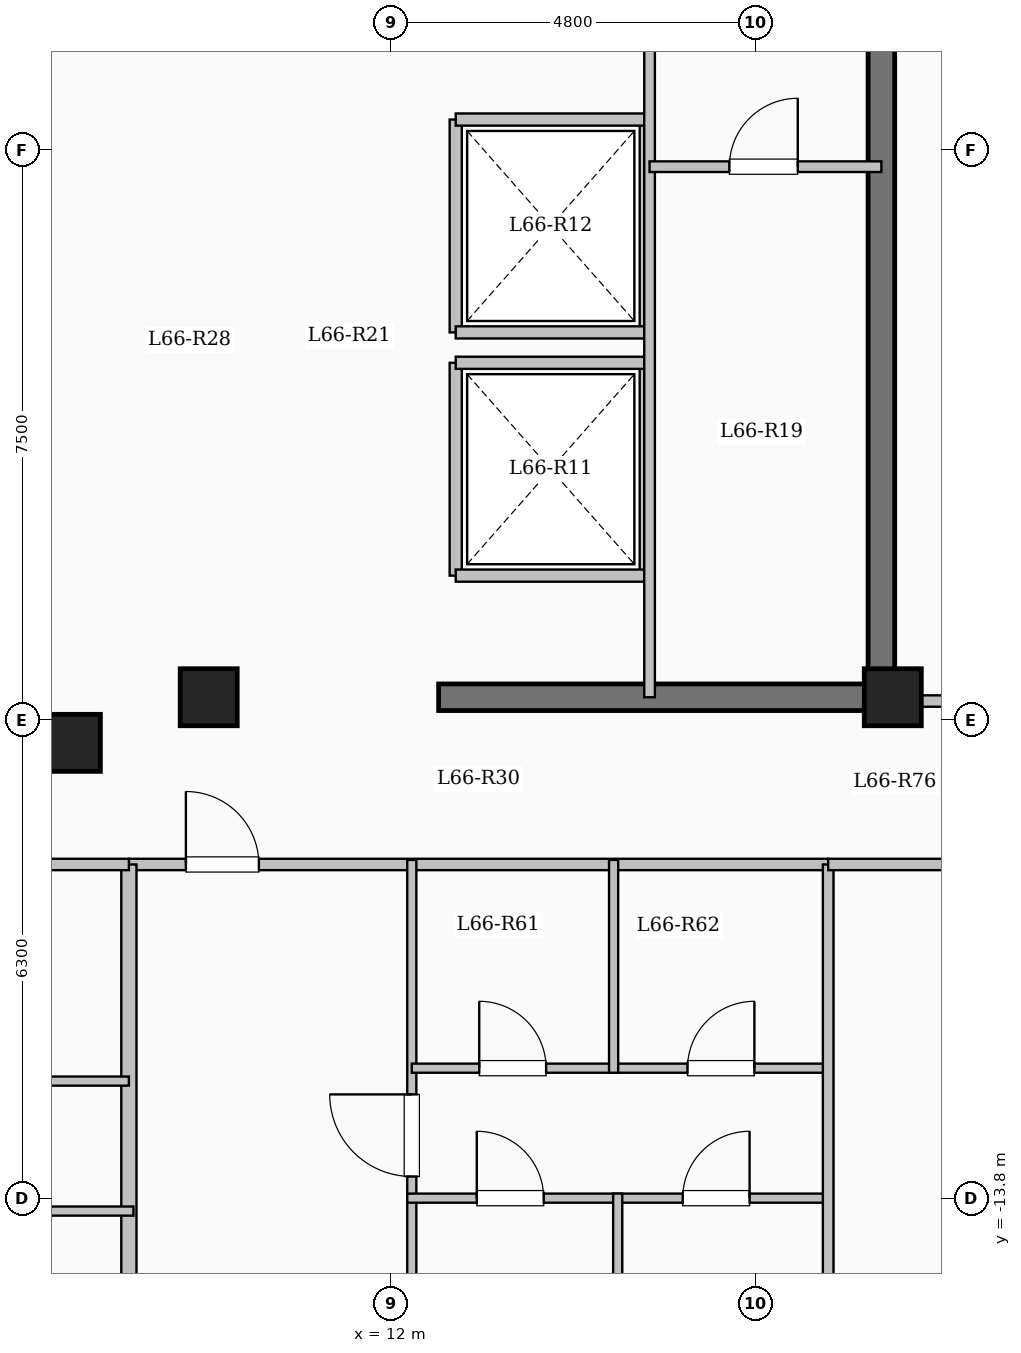
"""IFC4 building model, lengths in metres.
Left out: names, types, materials, properties, quantities, classifications, styles, units other than length and angle.
Written with IfcOpenShell. Run it as: python <this file> out.ifc"""

import sys

from ifc_helpers import new_model, si_unit, direction, frame, frame_2d, origin, origin_2d, place, context, subcontext, project, spatial, rectangle, extrude, element, fill, save


model = new_model("IFC4")
c1 = context("Model", 3, precision=1e-05, world=origin(), true_north=direction((0.0, 1.0)))
c2 = subcontext(c1, "Body", "Model", "MODEL_VIEW")
j1 = project(units=[si_unit("LENGTHUNIT", "METRE"), si_unit("PLANEANGLEUNIT", "RADIAN")], contexts=[c1])
p1 = place(None, origin())
s1 = spatial("IfcSite", under=j1, at=p1, CompositionType="ELEMENT")
p2 = place(p1, origin())
s2 = spatial("IfcBuilding", under=s1, at=p2, CompositionType="ELEMENT")
p3 = place(p2, frame((0.0, 0.0, 244.85)))
s3 = spatial("IfcBuildingStorey", under=s2, at=p3, CompositionType="ELEMENT", Elevation=244.85)
for number, where, z_axis, x_axis in (
    (1, (7.8, -7.8, 0.0), (0.0, 0.0, 1.0), (1.0, 0.0, 0.0)),
    (2, (9.6, -7.2, 0.0), (0.0, 0.0, 1.0), (1.0, 0.0, 0.0)),
    (3, (18.6, -7.2, 0.0), (0.0, 0.0, 1.0), (1.0, 0.0, 0.0)),
):
    element("IfcColumn", number, at=place(p3, frame(where, z_axis=z_axis, x_axis=x_axis)), inside=s3, PredefinedType="COLUMN", context=c2, shape_type="SweptSolid", body=[
        extrude(rectangle(XDim=0.75, YDim=0.75, at=origin_2d()), origin(), (0.0, 0.0, 1.0), 3.35),
    ])
for number, where, z_axis, x_axis in (
    (4, (12.85, -5.6, 0.0), (0.0, 0.0, 1.0), (0.0, 1.0, 0.0)),
    (5, (15.35, -5.6, 0.0), (0.0, 0.0, 1.0), (0.0, 1.0, 0.0)),
):
    element("IfcWall", number, at=place(p3, frame(where, z_axis=z_axis, x_axis=x_axis)), inside=s3, PredefinedType="SOLIDWALL", context=c2, shape_type="SweptSolid", body=[
        extrude(rectangle(XDim=2.8, YDim=0.16, at=frame_2d((1.4, 0.0))), origin(), (0.0, 0.0, 1.0), 3.1),
    ])
for number, where, z_axis, x_axis in (
    (6, (12.85, -5.6, 0.0), (0.0, 0.0, 1.0), (1.0, 0.0, 0.0)),
    (7, (12.85, -2.8, 0.0), (0.0, 0.0, 1.0), (1.0, 0.0, 0.0)),
):
    element("IfcWall", number, at=place(p3, frame(where, z_axis=z_axis, x_axis=x_axis)), inside=s3, PredefinedType="SOLIDWALL", context=c2, shape_type="SweptSolid", body=[
        extrude(rectangle(XDim=2.5, YDim=0.16, at=frame_2d((1.25, 0.0))), origin(), (0.0, 0.0, 1.0), 3.1),
    ])
for number, where, z_axis, x_axis in (
    (8, (12.85, -2.4, 0.0), (0.0, 0.0, 1.0), (0.0, 1.0, 0.0)),
    (9, (15.35, -2.4, 0.0), (0.0, 0.0, 1.0), (0.0, 1.0, 0.0)),
):
    element("IfcWall", number, at=place(p3, frame(where, z_axis=z_axis, x_axis=x_axis)), inside=s3, PredefinedType="SOLIDWALL", context=c2, shape_type="SweptSolid", body=[
        extrude(rectangle(XDim=2.8, YDim=0.16, at=frame_2d((1.4, 0.0))), origin(), (0.0, 0.0, 1.0), 3.1),
    ])
for number, where, z_axis, x_axis in (
    (10, (12.85, -2.4, 0.0), (0.0, 0.0, 1.0), (1.0, 0.0, 0.0)),
    (11, (12.85, 0.4, 0.0), (0.0, 0.0, 1.0), (1.0, 0.0, 0.0)),
):
    element("IfcWall", number, at=place(p3, frame(where, z_axis=z_axis, x_axis=x_axis)), inside=s3, PredefinedType="SOLIDWALL", context=c2, shape_type="SweptSolid", body=[
        extrude(rectangle(XDim=2.5, YDim=0.16, at=frame_2d((1.25, 0.0))), origin(), (0.0, 0.0, 1.0), 3.1),
    ])
p4 = place(p3, frame((18.45, -7.375, 0.0), z_axis=(0.0, 0.0, 1.0), x_axis=(0.0, 1.0, 0.0)))
e12 = element("IfcWall", 12, at=p4, inside=s3, PredefinedType="SHEAR", context=c2, shape_type="SweptSolid", body=[
    extrude(rectangle(XDim=14.05, YDim=0.35, at=frame_2d((7.025, 0.0))), origin(), (0.0, 0.0, 1.0), 3.35),
])
p5 = place(p3, frame((12.625, -7.2, 0.0), z_axis=(0.0, 0.0, 1.0), x_axis=(1.0, 0.0, 0.0)))
e13 = element("IfcWall", 13, at=p5, inside=s3, PredefinedType="SHEAR", context=c2, shape_type="SweptSolid", body=[
    extrude(rectangle(XDim=6.0, YDim=0.35, at=frame_2d((3.0, 0.0))), origin(), (0.0, 0.0, 1.0), 3.35),
])
p6 = place(p3, frame((15.4, -7.2, 0.0), z_axis=(0.0, 0.0, 1.0), x_axis=(0.0, 1.0, 0.0)))
e14 = element("IfcWall", 14, at=p6, inside=s3, PredefinedType="PARTITIONING", context=c2, shape_type="SweptSolid", body=[
    extrude(rectangle(XDim=10.45, YDim=0.14, at=frame_2d((5.225, 0.0))), origin(), (0.0, 0.0, 1.0), 3.1),
])
p7 = place(p6, frame((9.25, 0.0, 0.0)))
e15 = element("IfcOpeningElement", 15, at=p7, cuts=e14, PredefinedType="OPENING", context=c2, shape_type="SweptSolid", body=[
    extrude(rectangle(XDim=0.9, YDim=2.08, at=frame_2d((0.45, 1.04))), frame((0.0, 0.08, 0.0), z_axis=(0.0, -1.0, 0.0), x_axis=(1.0, 0.0, 0.0)), (0.0, 0.0, 1.0), 0.16),
])
p8 = place(p3, frame((15.4, -0.22, 0.0), z_axis=(0.0, 0.0, 1.0), x_axis=(1.0, 0.0, 0.0)))
e16 = element("IfcWall", 16, at=p8, inside=s3, PredefinedType="PARTITIONING", context=c2, shape_type="SweptSolid", body=[
    extrude(rectangle(XDim=3.05, YDim=0.14, at=frame_2d((1.525, 0.0))), origin(), (0.0, 0.0, 1.0), 3.1),
])
p9 = place(p8, frame((1.05, 0.0, 0.0)))
e17 = element("IfcOpeningElement", 17, at=p9, cuts=e16, PredefinedType="OPENING", context=c2, shape_type="SweptSolid", body=[
    extrude(rectangle(XDim=0.9, YDim=2.08, at=frame_2d((0.45, 1.04))), frame((0.0, 0.08, 0.0), z_axis=(0.0, -1.0, 0.0), x_axis=(1.0, 0.0, 0.0)), (0.0, 0.0, 1.0), 0.16),
])
p10 = place(p3, frame((8.55, -9.4, 0.0), z_axis=(0.0, 0.0, 1.0), x_axis=(1.0, 0.0, 0.0)))
e18 = element("IfcWall", 18, at=p10, inside=s3, PredefinedType="PARTITIONING", context=c2, shape_type="SweptSolid", body=[
    extrude(rectangle(XDim=9.2, YDim=0.15, at=frame_2d((4.6, 0.0))), origin(), (0.0, 0.0, 1.0), 3.1),
])
p11 = place(p10, frame((0.75, 0.0, 0.0)))
e19 = element("IfcOpeningElement", 19, at=p11, cuts=e18, PredefinedType="OPENING", context=c2, shape_type="SweptSolid", body=[
    extrude(rectangle(XDim=0.96, YDim=2.15, at=frame_2d((0.48, 1.075))), frame((0.0, 0.085, 0.0), z_axis=(0.0, -1.0, 0.0), x_axis=(1.0, 0.0, 0.0)), (0.0, 0.0, 1.0), 0.17),
])
p12 = place(p3, frame((12.272, -20.9, 0.0), z_axis=(0.0, 0.0, 1.0), x_axis=(0.0, 1.0, 0.0)))
e20 = element("IfcWall", 20, at=p12, inside=s3, PredefinedType="PARTITIONING", context=c2, shape_type="SweptSolid", body=[
    extrude(rectangle(XDim=11.56, YDim=0.12, at=frame_2d((5.78, 0.0))), origin(), (0.0, 0.0, 1.0), 3.1),
])
p13 = place(p12, frame((7.395, 0.0, 0.0)))
e21 = element("IfcOpeningElement", 21, at=p13, cuts=e20, PredefinedType="OPENING", context=c2, shape_type="SweptSolid", body=[
    extrude(rectangle(XDim=1.08, YDim=2.15, at=frame_2d((0.54, 1.075))), frame((0.0, 0.07, 0.0), z_axis=(0.0, -1.0, 0.0), x_axis=(1.0, 0.0, 0.0)), (0.0, 0.0, 1.0), 0.14),
])
p14 = place(p3, frame((12.272, -12.08, 0.0), z_axis=(0.0, 0.0, 1.0), x_axis=(1.0, 0.0, 0.0)))
e22 = element("IfcWall", 22, at=p14, inside=s3, PredefinedType="PARTITIONING", context=c2, shape_type="SweptSolid", body=[
    extrude(rectangle(XDim=2.655, YDim=0.12, at=frame_2d((1.328, 0.0))), origin(), (0.0, 0.0, 1.0), 2.785),
])
p15 = place(p14, frame((0.887, 0.0, 0.0)))
e23 = element("IfcOpeningElement", 23, at=p15, cuts=e22, PredefinedType="OPENING", context=c2, shape_type="SweptSolid", body=[
    extrude(rectangle(XDim=0.88, YDim=2.1, at=frame_2d((0.44, 1.05))), frame((0.0, 0.07, 0.0), z_axis=(0.0, -1.0, 0.0), x_axis=(1.0, 0.0, 0.0)), (0.0, 0.0, 1.0), 0.14),
])
p16 = place(p3, frame((14.927, -12.08, 0.0), z_axis=(0.0, 0.0, 1.0), x_axis=(1.0, 0.0, 0.0)))
e24 = element("IfcWall", 24, at=p16, inside=s3, PredefinedType="PARTITIONING", context=c2, shape_type="SweptSolid", body=[
    extrude(rectangle(XDim=2.823, YDim=0.12, at=frame_2d((1.412, 0.0))), origin(), (0.0, 0.0, 1.0), 3.1),
])
p17 = place(p16, frame((0.972, 0.0, 0.0)))
e25 = element("IfcOpeningElement", 25, at=p17, cuts=e24, PredefinedType="OPENING", context=c2, shape_type="SweptSolid", body=[
    extrude(rectangle(XDim=0.88, YDim=2.1, at=frame_2d((0.44, 1.05))), frame((0.0, 0.07, 0.0), z_axis=(0.0, -1.0, 0.0), x_axis=(1.0, 0.0, 0.0)), (0.0, 0.0, 1.0), 0.14),
])
p18 = place(p3, frame((12.212, -13.79, 0.0), z_axis=(0.0, 0.0, 1.0), x_axis=(1.0, 0.0, 0.0)))
e26 = element("IfcWall", 26, at=p18, inside=s3, PredefinedType="PARTITIONING", context=c2, shape_type="SweptSolid", body=[
    extrude(rectangle(XDim=5.598, YDim=0.12, at=frame_2d((2.799, 0.0))), origin(), (0.0, 0.0, 1.0), 2.785),
])
p19 = place(p18, frame((0.915, 0.0, 0.0)))
e27 = element("IfcOpeningElement", 27, at=p19, cuts=e26, PredefinedType="OPENING", context=c2, shape_type="SweptSolid", body=[
    extrude(rectangle(XDim=0.88, YDim=2.1, at=frame_2d((0.44, 1.05))), frame((0.0, 0.07, 0.0), z_axis=(0.0, -1.0, 0.0), x_axis=(1.0, 0.0, 0.0)), (0.0, 0.0, 1.0), 0.14),
])
p20 = place(p18, frame((3.624, 0.0, 0.0)))
e28 = element("IfcOpeningElement", 28, at=p20, cuts=e26, PredefinedType="OPENING", context=c2, shape_type="SweptSolid", body=[
    extrude(rectangle(XDim=0.88, YDim=2.1, at=frame_2d((0.44, 1.05))), frame((0.0, 0.07, 0.0), z_axis=(0.0, -1.0, 0.0), x_axis=(1.0, 0.0, 0.0)), (0.0, 0.0, 1.0), 0.14),
])
p21 = place(p3, frame((14.927, -12.14, 0.0), z_axis=(0.0, 0.0, 1.0), x_axis=(0.0, 1.0, 0.0)))
e29 = element("IfcWall", 29, at=p21, inside=s3, PredefinedType="PARTITIONING", context=c2, shape_type="SweptSolid", body=[
    extrude(rectangle(XDim=2.8, YDim=0.12, at=frame_2d((1.4, 0.0))), origin(), (0.0, 0.0, 1.0), 2.685),
])
p22 = place(p3, frame((14.981, -20.9, 0.0), z_axis=(0.0, 0.0, 1.0), x_axis=(0.0, 1.0, 0.0)))
e30 = element("IfcWall", 30, at=p22, inside=s3, PredefinedType="PARTITIONING", context=c2, shape_type="SweptSolid", body=[
    extrude(rectangle(XDim=7.17, YDim=0.12, at=frame_2d((3.585, 0.0))), origin(), (0.0, 0.0, 1.0), 2.685),
])
p23 = place(p3, frame((8.55, -21.504, 0.0), z_axis=(0.0, 0.0, 1.0), x_axis=(0.0, 1.0, 0.0)))
e31 = element("IfcWall", 31, at=p23, inside=s3, PredefinedType="SOLIDWALL", context=c2, shape_type="SweptSolid", body=[
    extrude(rectangle(XDim=12.104, YDim=0.2, at=frame_2d((6.052, 0.0))), origin(), (0.0, 0.0, 1.0), 3.1),
])
p24 = place(p3, frame((-8.55, -9.4, 0.0), z_axis=(0.0, 0.0, 1.0), x_axis=(1.0, 0.0, 0.0)))
e32 = element("IfcWall", 32, at=p24, inside=s3, PredefinedType="PARTITIONING", context=c2, shape_type="SweptSolid", body=[
    extrude(rectangle(XDim=17.1, YDim=0.15, at=frame_2d((8.55, 0.0))), origin(), (0.0, 0.0, 1.0), 3.1),
])
p25 = place(p24, frame((1.75, 0.0, 0.0)))
e33 = element("IfcOpeningElement", 33, at=p25, cuts=e32, PredefinedType="OPENING", context=c2, shape_type="SweptSolid", body=[
    extrude(rectangle(XDim=0.96, YDim=2.15, at=frame_2d((0.48, 1.075))), frame((0.0, 0.085, 0.0), z_axis=(0.0, -1.0, 0.0), x_axis=(1.0, 0.0, 0.0)), (0.0, 0.0, 1.0), 0.17),
])
p26 = place(p3, frame((3.697, -12.25, 0.0), z_axis=(0.0, 0.0, 1.0), x_axis=(1.0, 0.0, 0.0)))
e34 = element("IfcWall", 34, at=p26, inside=s3, PredefinedType="PARTITIONING", context=c2, shape_type="SweptSolid", body=[
    extrude(rectangle(XDim=4.853, YDim=0.12, at=frame_2d((2.427, 0.0))), origin(), (0.0, 0.0, 1.0), 2.785),
])
p27 = place(p26, frame((1.987, 0.0, 0.0)))
e35 = element("IfcOpeningElement", 35, at=p27, cuts=e34, PredefinedType="OPENING", context=c2, shape_type="SweptSolid", body=[
    extrude(rectangle(XDim=0.88, YDim=2.1, at=frame_2d((0.44, 1.05))), frame((0.0, 0.07, 0.0), z_axis=(0.0, -1.0, 0.0), x_axis=(1.0, 0.0, 0.0)), (0.0, 0.0, 1.0), 0.14),
])
p28 = place(p3, frame((-1.756, -13.96, 0.0), z_axis=(0.0, 0.0, 1.0), x_axis=(1.0, 0.0, 0.0)))
e36 = element("IfcWall", 36, at=p28, inside=s3, PredefinedType="PARTITIONING", context=c2, shape_type="SweptSolid", body=[
    extrude(rectangle(XDim=10.366, YDim=0.12, at=frame_2d((5.183, 0.0))), origin(), (0.0, 0.0, 1.0), 2.785),
])
p29 = place(p28, frame((1.256, 0.0, 0.0)))
e37 = element("IfcOpeningElement", 37, at=p29, cuts=e36, PredefinedType="OPENING", context=c2, shape_type="SweptSolid", body=[
    extrude(rectangle(XDim=0.88, YDim=2.1, at=frame_2d((0.44, 1.05))), frame((0.0, 0.07, 0.0), z_axis=(0.0, -1.0, 0.0), x_axis=(1.0, 0.0, 0.0)), (0.0, 0.0, 1.0), 0.14),
])
p30 = place(p28, frame((4.648, 0.0, 0.0)))
e38 = element("IfcOpeningElement", 38, at=p30, cuts=e36, PredefinedType="OPENING", context=c2, shape_type="SweptSolid", body=[
    extrude(rectangle(XDim=0.88, YDim=2.1, at=frame_2d((0.44, 1.05))), frame((0.0, 0.07, 0.0), z_axis=(0.0, -1.0, 0.0), x_axis=(1.0, 0.0, 0.0)), (0.0, 0.0, 1.0), 0.14),
])
p31 = place(p28, frame((8.04, 0.0, 0.0)))
e39 = element("IfcOpeningElement", 39, at=p31, cuts=e36, PredefinedType="OPENING", context=c2, shape_type="SweptSolid", body=[
    extrude(rectangle(XDim=0.88, YDim=2.1, at=frame_2d((0.44, 1.05))), frame((0.0, 0.07, 0.0), z_axis=(0.0, -1.0, 0.0), x_axis=(1.0, 0.0, 0.0)), (0.0, 0.0, 1.0), 0.14),
])
p32 = place(p3, frame((18.45, -7.25, 0.0), z_axis=(0.0, 0.0, 1.0), x_axis=(1.0, 0.0, 0.0)))
e40 = element("IfcWall", 40, at=p32, inside=s3, PredefinedType="PARTITIONING", context=c2, shape_type="SweptSolid", body=[
    extrude(rectangle(XDim=4.23, YDim=0.15, at=frame_2d((2.115, 0.0))), origin(), (0.0, 0.0, 1.0), 3.1),
])
p33 = place(p32, frame((1.65, 0.0, 0.0)))
e41 = element("IfcOpeningElement", 41, at=p33, cuts=e40, PredefinedType="OPENING", context=c2, shape_type="SweptSolid", body=[
    extrude(rectangle(XDim=0.96, YDim=2.15, at=frame_2d((0.48, 1.075))), frame((0.0, 0.085, 0.0), z_axis=(0.0, -1.0, 0.0), x_axis=(1.0, 0.0, 0.0)), (0.0, 0.0, 1.0), 0.17),
])
p34 = place(p3, frame((17.75, -17.55, 0.0), z_axis=(0.0, 0.0, 1.0), x_axis=(0.0, 1.0, 0.0)))
e42 = element("IfcWall", 42, at=p34, inside=s3, PredefinedType="PARTITIONING", context=c2, shape_type="SweptSolid", body=[
    extrude(rectangle(XDim=8.15, YDim=0.14, at=frame_2d((4.075, 0.0))), origin(), (0.0, 0.0, 1.0), 3.1),
])
p35 = place(p3, frame((17.75, -9.4, 0.0), z_axis=(0.0, 0.0, 1.0), x_axis=(1.0, 0.0, 0.0)))
e43 = element("IfcWall", 43, at=p35, inside=s3, PredefinedType="PARTITIONING", context=c2, shape_type="SweptSolid", body=[
    extrude(rectangle(XDim=4.93, YDim=0.15, at=frame_2d((2.465, 0.0))), origin(), (0.0, 0.0, 1.0), 3.1),
])
p36 = place(p35, frame((1.99, 0.0, 0.0)))
e44 = element("IfcOpeningElement", 44, at=p36, cuts=e43, PredefinedType="OPENING", context=c2, shape_type="SweptSolid", body=[
    extrude(rectangle(XDim=0.95, YDim=2.15, at=frame_2d((0.475, 1.075))), frame((0.0, 0.085, 0.0), z_axis=(0.0, -1.0, 0.0), x_axis=(1.0, 0.0, 0.0)), (0.0, 0.0, 1.0), 0.17),
])
p37 = place(p9, origin())
e45 = element("IfcDoor", 45, at=p37, inside=s3, OperationType="SINGLE_SWING_RIGHT", PredefinedType="DOOR", context=c2, shape_type="SweptSolid", body=[
    extrude(rectangle(XDim=0.9, YDim=2.08, at=frame_2d((0.45, 1.04))), frame((0.0, 0.025, 0.0), z_axis=(0.0, -1.0, 0.0), x_axis=(1.0, 0.0, 0.0)), (0.0, 0.0, 1.0), 0.05),
])
fill(e17, e45)
p38 = place(p11, origin())
e46 = element("IfcDoor", 46, at=p38, inside=s3, OperationType="SINGLE_SWING_LEFT", PredefinedType="DOOR", context=c2, shape_type="SweptSolid", body=[
    extrude(rectangle(XDim=0.96, YDim=2.15, at=frame_2d((0.48, 1.075))), frame((0.0, 0.025, 0.0), z_axis=(0.0, -1.0, 0.0), x_axis=(1.0, 0.0, 0.0)), (0.0, 0.0, 1.0), 0.05),
])
fill(e19, e46)
p39 = place(p13, origin())
e47 = element("IfcDoor", 47, at=p39, inside=s3, OperationType="SINGLE_SWING_RIGHT", PredefinedType="DOOR", context=c2, shape_type="SweptSolid", body=[
    extrude(rectangle(XDim=1.08, YDim=2.15, at=frame_2d((0.54, 1.075))), frame((0.0, 0.025, 0.0), z_axis=(0.0, -1.0, 0.0), x_axis=(1.0, 0.0, 0.0)), (0.0, 0.0, 1.0), 0.05),
])
fill(e21, e47)
p40 = place(p15, origin())
e48 = element("IfcDoor", 48, at=p40, inside=s3, OperationType="SINGLE_SWING_LEFT", PredefinedType="DOOR", context=c2, shape_type="SweptSolid", body=[
    extrude(rectangle(XDim=0.88, YDim=2.1, at=frame_2d((0.44, 1.05))), frame((0.0, 0.025, 0.0), z_axis=(0.0, -1.0, 0.0), x_axis=(1.0, 0.0, 0.0)), (0.0, 0.0, 1.0), 0.05),
])
fill(e23, e48)
p41 = place(p17, origin())
e49 = element("IfcDoor", 49, at=p41, inside=s3, OperationType="SINGLE_SWING_RIGHT", PredefinedType="DOOR", context=c2, shape_type="SweptSolid", body=[
    extrude(rectangle(XDim=0.88, YDim=2.1, at=frame_2d((0.44, 1.05))), frame((0.0, 0.025, 0.0), z_axis=(0.0, -1.0, 0.0), x_axis=(1.0, 0.0, 0.0)), (0.0, 0.0, 1.0), 0.05),
])
fill(e25, e49)
p42 = place(p19, origin())
e50 = element("IfcDoor", 50, at=p42, inside=s3, OperationType="SINGLE_SWING_LEFT", PredefinedType="DOOR", context=c2, shape_type="SweptSolid", body=[
    extrude(rectangle(XDim=0.88, YDim=2.1, at=frame_2d((0.44, 1.05))), frame((0.0, 0.025, 0.0), z_axis=(0.0, -1.0, 0.0), x_axis=(1.0, 0.0, 0.0)), (0.0, 0.0, 1.0), 0.05),
])
fill(e27, e50)
p43 = place(p20, origin())
e51 = element("IfcDoor", 51, at=p43, inside=s3, OperationType="SINGLE_SWING_RIGHT", PredefinedType="DOOR", context=c2, shape_type="SweptSolid", body=[
    extrude(rectangle(XDim=0.88, YDim=2.1, at=frame_2d((0.44, 1.05))), frame((0.0, 0.025, 0.0), z_axis=(0.0, -1.0, 0.0), x_axis=(1.0, 0.0, 0.0)), (0.0, 0.0, 1.0), 0.05),
])
fill(e28, e51)
save(model, sys.argv[1])
